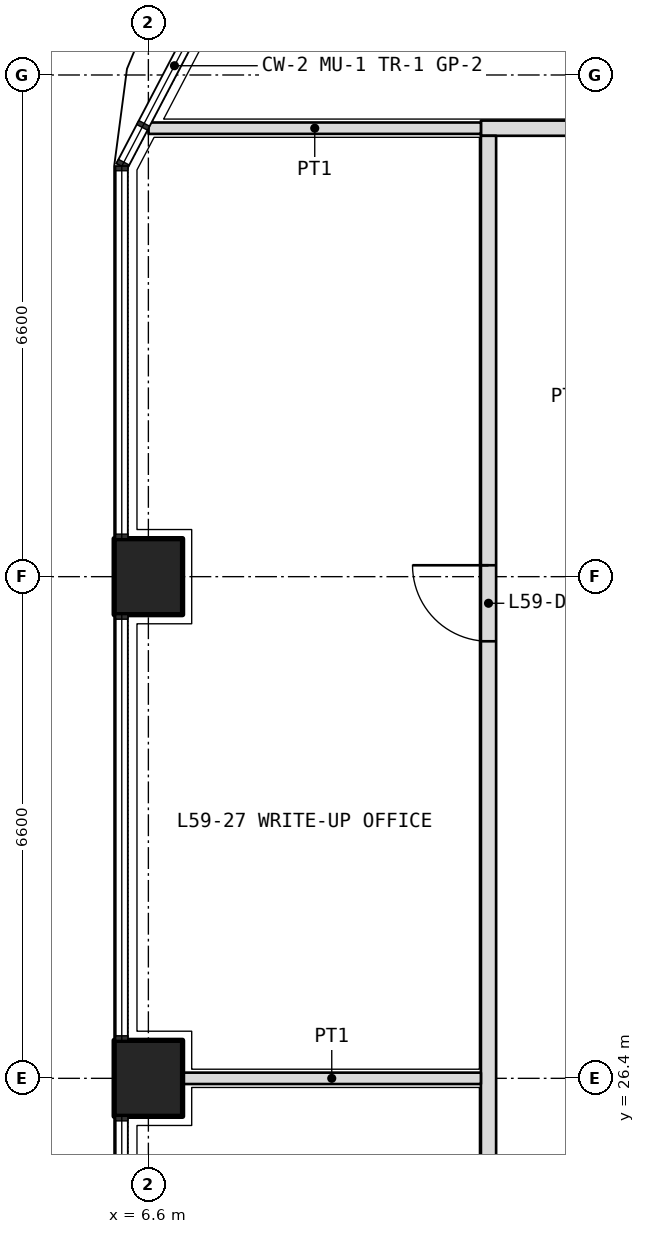
"""IFC4 building model, lengths in metres.
Left out: names, types, materials, properties, quantities, classifications, styles, units other than length and angle.
Written with IfcOpenShell. Run it as: python <this file> out.ifc"""

import sys

from ifc_helpers import new_model, si_unit, direction, frame, frame_2d, origin, origin_2d, place, context, subcontext, project, spatial, rectangle, extrude, element, fill, save


model = new_model("IFC4")
c1 = context("Model", 3, precision=1e-05, world=origin(), true_north=direction((0.0, 1.0)))
c2 = subcontext(c1, "Body", "Model", "MODEL_VIEW")
j1 = project(units=[si_unit("LENGTHUNIT", "METRE"), si_unit("PLANEANGLEUNIT", "RADIAN")], contexts=[c1])
p1 = place(None, origin())
s1 = spatial("IfcSite", under=j1, at=p1, CompositionType="ELEMENT")
p2 = place(p1, origin())
s2 = spatial("IfcBuilding", under=s1, at=p2, CompositionType="ELEMENT")
p3 = place(p2, frame((0.0, 0.0, 258.6)))
s3 = spatial("IfcBuildingStorey", under=s2, at=p3, CompositionType="ELEMENT", Elevation=258.6)
for number, where, z_axis, x_axis in (
    (1, (6.6, 26.4, 0.0), (0.0, 0.0, 1.0), (0.0, 1.0, 0.0)),
    (2, (6.6, 33.0, 0.0), (0.0, 0.0, 1.0), (0.0, 1.0, 0.0)),
):
    element("IfcColumn", number, at=place(p3, frame(where, z_axis=z_axis, x_axis=x_axis)), inside=s3, PredefinedType="COLUMN", context=c2, shape_type="SweptSolid", body=[
        extrude(rectangle(XDim=1.0, YDim=0.9, at=origin_2d()), origin(), (0.0, 0.0, 1.0), 4.2),
    ])
p4 = place(p3, frame((10.975, 38.9, 0.0), z_axis=(0.0, 0.0, 1.0), x_axis=(1.0, 0.0, 0.0)))
e3 = element("IfcWall", 3, at=p4, inside=s3, PredefinedType="PARTITIONING", context=c2, shape_type="SweptSolid", body=[
    extrude(rectangle(XDim=30.85, YDim=0.2, at=frame_2d((15.425, 0.0))), origin(), (0.0, 0.0, 1.0), 3.0),
])
p5 = place(p4, frame((7.262, 0.0, 0.0)))
e4 = element("IfcOpeningElement", 4, at=p5, cuts=e3, PredefinedType="OPENING", context=c2, shape_type="SweptSolid", body=[
    extrude(rectangle(XDim=1.0, YDim=2.1, at=frame_2d((0.5, 1.05))), frame((0.0, 0.11, 0.0), z_axis=(0.0, -1.0, 0.0), x_axis=(1.0, 0.0, 0.0)), (0.0, 0.0, 1.0), 0.22),
])
p6 = place(p4, frame((21.525, 0.0, 0.0)))
e5 = element("IfcOpeningElement", 5, at=p6, cuts=e3, PredefinedType="OPENING", context=c2, shape_type="SweptSolid", body=[
    extrude(rectangle(XDim=1.0, YDim=2.1, at=frame_2d((0.5, 1.05))), frame((0.0, 0.11, 0.0), z_axis=(0.0, -1.0, 0.0), x_axis=(1.0, 0.0, 0.0)), (0.0, 0.0, 1.0), 0.22),
])
p7 = place(p4, frame((29.087, 0.0, 0.0)))
e6 = element("IfcOpeningElement", 6, at=p7, cuts=e3, PredefinedType="OPENING", context=c2, shape_type="SweptSolid", body=[
    extrude(rectangle(XDim=1.2, YDim=2.1, at=frame_2d((0.6, 1.05))), frame((0.0, 0.11, 0.0), z_axis=(0.0, -1.0, 0.0), x_axis=(1.0, 0.0, 0.0)), (0.0, 0.0, 1.0), 0.22),
])
p8 = place(p3, frame((11.075, 7.4, 0.0), z_axis=(0.0, 0.0, 1.0), x_axis=(0.0, 1.0, 0.0)))
e7 = element("IfcWall", 7, at=p8, inside=s3, PredefinedType="PARTITIONING", context=c2, shape_type="SweptSolid", body=[
    extrude(rectangle(XDim=31.4, YDim=0.2, at=frame_2d((15.7, 0.0))), origin(), (0.0, 0.0, 1.0), 3.0),
])
p9 = place(p8, frame((2.25, 0.0, 0.0)))
e8 = element("IfcOpeningElement", 8, at=p9, cuts=e7, PredefinedType="OPENING", context=c2, shape_type="SweptSolid", body=[
    extrude(rectangle(XDim=1.2, YDim=2.1, at=frame_2d((0.6, 1.05))), frame((0.0, 0.11, 0.0), z_axis=(0.0, -1.0, 0.0), x_axis=(1.0, 0.0, 0.0)), (0.0, 0.0, 1.0), 0.22),
])
p10 = place(p8, frame((6.35, 0.0, 0.0)))
e9 = element("IfcOpeningElement", 9, at=p10, cuts=e7, PredefinedType="OPENING", context=c2, shape_type="SweptSolid", body=[
    extrude(rectangle(XDim=1.0, YDim=2.1, at=frame_2d((0.5, 1.05))), frame((0.0, 0.11, 0.0), z_axis=(0.0, -1.0, 0.0), x_axis=(1.0, 0.0, 0.0)), (0.0, 0.0, 1.0), 0.22),
])
p11 = place(p8, frame((9.45, 0.0, 0.0)))
e10 = element("IfcOpeningElement", 10, at=p11, cuts=e7, PredefinedType="OPENING", context=c2, shape_type="SweptSolid", body=[
    extrude(rectangle(XDim=0.9, YDim=2.1, at=frame_2d((0.45, 1.05))), frame((0.0, 0.11, 0.0), z_axis=(0.0, -1.0, 0.0), x_axis=(1.0, 0.0, 0.0)), (0.0, 0.0, 1.0), 0.22),
])
p12 = place(p8, frame((13.35, 0.0, 0.0)))
e11 = element("IfcOpeningElement", 11, at=p12, cuts=e7, PredefinedType="OPENING", context=c2, shape_type="SweptSolid", body=[
    extrude(rectangle(XDim=0.9, YDim=2.1, at=frame_2d((0.45, 1.05))), frame((0.0, 0.11, 0.0), z_axis=(0.0, -1.0, 0.0), x_axis=(1.0, 0.0, 0.0)), (0.0, 0.0, 1.0), 0.22),
])
p13 = place(p8, frame((16.85, 0.0, 0.0)))
e12 = element("IfcOpeningElement", 12, at=p13, cuts=e7, PredefinedType="OPENING", context=c2, shape_type="SweptSolid", body=[
    extrude(rectangle(XDim=1.0, YDim=2.1, at=frame_2d((0.5, 1.05))), frame((0.0, 0.11, 0.0), z_axis=(0.0, -1.0, 0.0), x_axis=(1.0, 0.0, 0.0)), (0.0, 0.0, 1.0), 0.22),
])
p14 = place(p8, frame((24.75, 0.0, 0.0)))
e13 = element("IfcOpeningElement", 13, at=p14, cuts=e7, PredefinedType="OPENING", context=c2, shape_type="SweptSolid", body=[
    extrude(rectangle(XDim=1.0, YDim=2.1, at=frame_2d((0.5, 1.05))), frame((0.0, 0.11, 0.0), z_axis=(0.0, -1.0, 0.0), x_axis=(1.0, 0.0, 0.0)), (0.0, 0.0, 1.0), 0.22),
])
p15 = place(p3, frame((6.603, 38.9, 0.0), z_axis=(0.0, 0.0, 1.0), x_axis=(1.0, 0.0, 0.0)))
e14 = element("IfcWall", 14, at=p15, inside=s3, PredefinedType="PARTITIONING", context=c2, shape_type="SweptSolid", body=[
    extrude(rectangle(XDim=4.373, YDim=0.15, at=frame_2d((2.186, 0.0))), origin(), (0.0, 0.0, 1.0), 2.7),
])
p16 = place(p3, frame((7.05, 26.4, 0.0), z_axis=(0.0, 0.0, 1.0), x_axis=(1.0, 0.0, 0.0)))
e15 = element("IfcWall", 15, at=p16, inside=s3, PredefinedType="PARTITIONING", context=c2, shape_type="SweptSolid", body=[
    extrude(rectangle(XDim=3.925, YDim=0.15, at=frame_2d((1.962, 0.0))), origin(), (0.0, 0.0, 1.0), 3.0),
])
p17 = place(p14, origin())
e16 = element("IfcDoor", 16, at=p17, inside=s3, OperationType="SINGLE_SWING_RIGHT", PredefinedType="DOOR", context=c2, shape_type="SweptSolid", body=[
    extrude(rectangle(XDim=1.0, YDim=2.1, at=frame_2d((0.5, 1.05))), frame((0.0, 0.025, 0.0), z_axis=(0.0, -1.0, 0.0), x_axis=(1.0, 0.0, 0.0)), (0.0, 0.0, 1.0), 0.05),
])
fill(e13, e16)
save(model, sys.argv[1])
